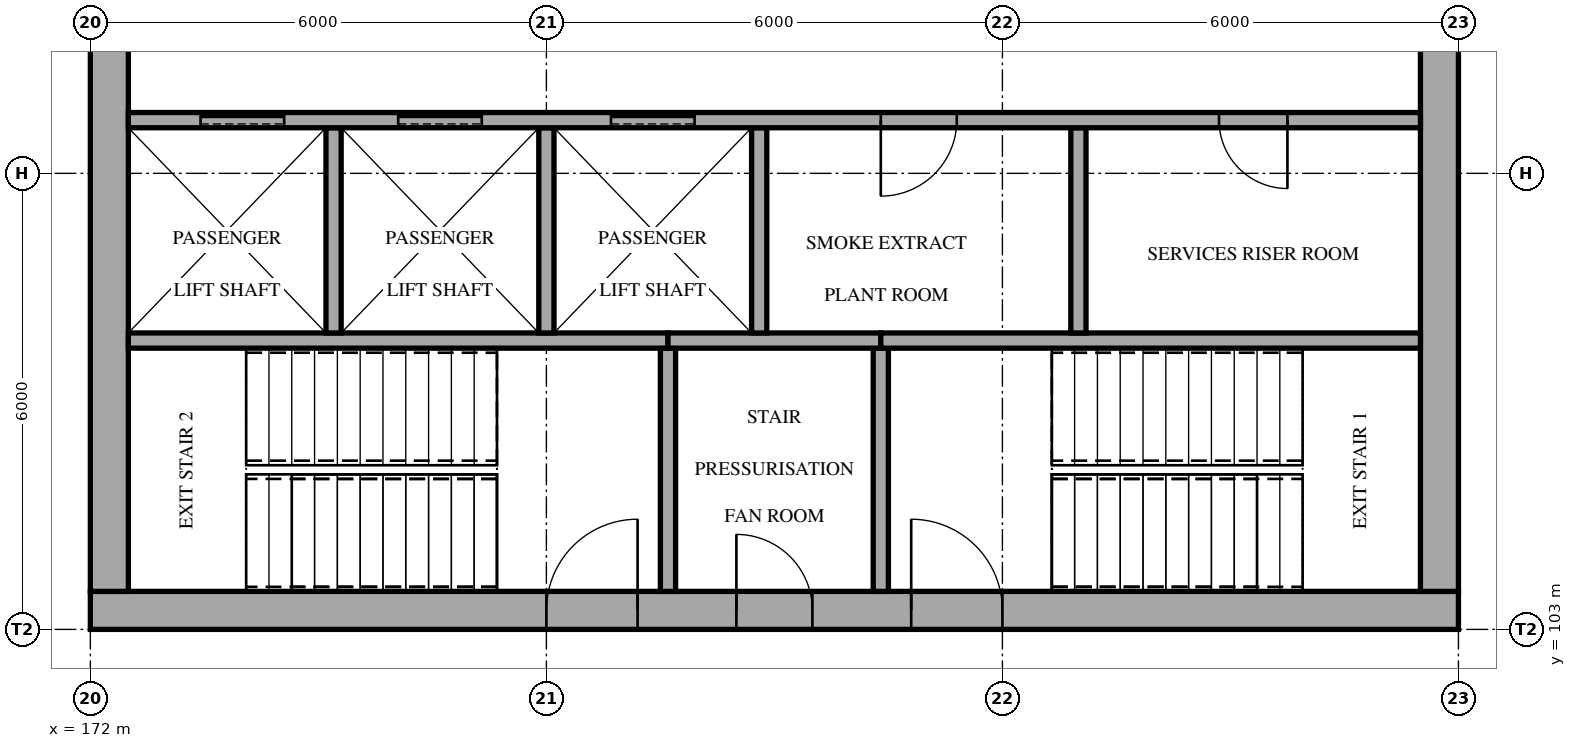
"""IFC4 building model, lengths in metres.
Left out: names, types, materials, properties, quantities, classifications, styles, units other than length and angle.
Written with IfcOpenShell. Run it as: python <this file> out.ifc"""

import sys

from ifc_helpers import new_model, si_unit, direction, frame, frame_2d, origin, place, context, subcontext, project, spatial, rectangle, extrude, element, fill, save


model = new_model("IFC4")
c1 = context("Model", 3, precision=1e-05, world=origin(), true_north=direction((0.0, 1.0)))
c2 = subcontext(c1, "Body", "Model", "MODEL_VIEW")
j1 = project(units=[si_unit("LENGTHUNIT", "METRE"), si_unit("PLANEANGLEUNIT", "RADIAN")], contexts=[c1])
p1 = place(None, origin())
s1 = spatial("IfcSite", under=j1, at=p1, CompositionType="ELEMENT")
p2 = place(p1, origin())
s2 = spatial("IfcBuilding", under=s1, at=p2, CompositionType="ELEMENT")
p3 = place(p2, origin())
s3 = spatial("IfcBuildingStorey", under=s2, at=p3, CompositionType="ELEMENT", Elevation=0.0)
p4 = place(p3, frame((172.0, 103.25, 0.0), z_axis=(0.0, 0.0, 1.0), x_axis=(1.0, 0.0, 0.0)))
e1 = element("IfcWall", 1, at=p4, inside=s3, PredefinedType="SHEAR", context=c2, shape_type="SweptSolid", body=[
    extrude(rectangle(XDim=18.0, YDim=0.5, at=frame_2d((9.0, 0.0))), origin(), (0.0, 0.0, 1.0), 5.0),
])
p5 = place(p4, frame((8.5, 0.0, 0.0)))
e2 = element("IfcOpeningElement", 2, at=p5, cuts=e1, PredefinedType="OPENING", context=c2, shape_type="SweptSolid", body=[
    extrude(rectangle(XDim=1.0, YDim=2.1, at=frame_2d((0.5, 1.05))), frame((0.0, 0.26, 0.0), z_axis=(0.0, -1.0, 0.0), x_axis=(1.0, 0.0, 0.0)), (0.0, 0.0, 1.0), 0.52),
])
p6 = place(p4, frame((6.0, 0.0, 0.0)))
e3 = element("IfcOpeningElement", 3, at=p6, cuts=e1, PredefinedType="OPENING", context=c2, shape_type="SweptSolid", body=[
    extrude(rectangle(XDim=1.2, YDim=2.1, at=frame_2d((0.6, 1.05))), frame((0.0, 0.26, 0.0), z_axis=(0.0, -1.0, 0.0), x_axis=(1.0, 0.0, 0.0)), (0.0, 0.0, 1.0), 0.52),
])
p7 = place(p4, frame((10.8, 0.0, 0.0)))
e4 = element("IfcOpeningElement", 4, at=p7, cuts=e1, PredefinedType="OPENING", context=c2, shape_type="SweptSolid", body=[
    extrude(rectangle(XDim=1.2, YDim=2.1, at=frame_2d((0.6, 1.05))), frame((0.0, 0.26, 0.0), z_axis=(0.0, -1.0, 0.0), x_axis=(1.0, 0.0, 0.0)), (0.0, 0.0, 1.0), 0.52),
])
p8 = place(p3, frame((172.25, 103.5, 0.0), z_axis=(0.0, 0.0, 1.0), x_axis=(0.0, 1.0, 0.0)))
e5 = element("IfcWall", 5, at=p8, inside=s3, PredefinedType="SHEAR", context=c2, shape_type="SweptSolid", body=[
    extrude(rectangle(XDim=17.0, YDim=0.5, at=frame_2d((8.5, 0.0))), origin(), (0.0, 0.0, 1.0), 5.0),
])
p9 = place(p8, frame((7.2, 0.0, 0.0)))
e6 = element("IfcOpeningElement", 6, at=p9, cuts=e5, PredefinedType="OPENING", context=c2, shape_type="SweptSolid", body=[
    extrude(rectangle(XDim=1.4, YDim=2.1, at=frame_2d((0.7, 1.05))), frame((0.0, 0.26, 0.0), z_axis=(0.0, -1.0, 0.0), x_axis=(1.0, 0.0, 0.0)), (0.0, 0.0, 1.0), 0.52),
])
p10 = place(p3, frame((189.75, 103.5, 0.0), z_axis=(0.0, 0.0, 1.0), x_axis=(0.0, 1.0, 0.0)))
e7 = element("IfcWall", 7, at=p10, inside=s3, PredefinedType="SHEAR", context=c2, shape_type="SweptSolid", body=[
    extrude(rectangle(XDim=17.0, YDim=0.5, at=frame_2d((8.5, 0.0))), origin(), (0.0, 0.0, 1.0), 5.0),
])
p11 = place(p10, frame((7.2, 0.0, 0.0)))
e8 = element("IfcOpeningElement", 8, at=p11, cuts=e7, PredefinedType="OPENING", context=c2, shape_type="SweptSolid", body=[
    extrude(rectangle(XDim=1.4, YDim=2.1, at=frame_2d((0.7, 1.05))), frame((0.0, 0.26, 0.0), z_axis=(0.0, -1.0, 0.0), x_axis=(1.0, 0.0, 0.0)), (0.0, 0.0, 1.0), 0.52),
])
for number, where, z_axis, x_axis in (
    (9, (179.6, 103.5, 0.0), (0.0, 0.0, 1.0), (0.0, 1.0, 0.0)),
    (10, (182.4, 103.5, 0.0), (0.0, 0.0, 1.0), (0.0, 1.0, 0.0)),
):
    element("IfcWall", number, at=place(p3, frame(where, z_axis=z_axis, x_axis=x_axis)), inside=s3, PredefinedType="SOLIDWALL", context=c2, shape_type="SweptSolid", body=[
        extrude(rectangle(XDim=3.2, YDim=0.2, at=frame_2d((1.6, 0.0))), origin(), (0.0, 0.0, 1.0), 4.8),
    ])
p12 = place(p3, frame((172.5, 106.8, 0.0), z_axis=(0.0, 0.0, 1.0), x_axis=(1.0, 0.0, 0.0)))
e11 = element("IfcWall", 11, at=p12, inside=s3, PredefinedType="SOLIDWALL", context=c2, shape_type="SweptSolid", body=[
    extrude(rectangle(XDim=7.1, YDim=0.2, at=frame_2d((3.55, 0.0))), origin(), (0.0, 0.0, 1.0), 4.8),
])
p13 = place(p3, frame((179.6, 106.8, 0.0), z_axis=(0.0, 0.0, 1.0), x_axis=(1.0, 0.0, 0.0)))
e12 = element("IfcWall", 12, at=p13, inside=s3, PredefinedType="SOLIDWALL", context=c2, shape_type="SweptSolid", body=[
    extrude(rectangle(XDim=2.8, YDim=0.2, at=frame_2d((1.4, 0.0))), origin(), (0.0, 0.0, 1.0), 4.8),
])
p14 = place(p3, frame((182.4, 106.8, 0.0), z_axis=(0.0, 0.0, 1.0), x_axis=(1.0, 0.0, 0.0)))
e13 = element("IfcWall", 13, at=p14, inside=s3, PredefinedType="SOLIDWALL", context=c2, shape_type="SweptSolid", body=[
    extrude(rectangle(XDim=7.1, YDim=0.2, at=frame_2d((3.55, 0.0))), origin(), (0.0, 0.0, 1.0), 4.8),
])
for number, where, z_axis, x_axis in (
    (14, (175.2, 106.9, 0.0), (0.0, 0.0, 1.0), (0.0, 1.0, 0.0)),
    (15, (178.0, 106.9, 0.0), (0.0, 0.0, 1.0), (0.0, 1.0, 0.0)),
    (16, (180.8, 106.9, 0.0), (0.0, 0.0, 1.0), (0.0, 1.0, 0.0)),
    (17, (185.0, 106.9, 0.0), (0.0, 0.0, 1.0), (0.0, 1.0, 0.0)),
):
    element("IfcWall", number, at=place(p3, frame(where, z_axis=z_axis, x_axis=x_axis)), inside=s3, PredefinedType="SOLIDWALL", context=c2, shape_type="SweptSolid", body=[
        extrude(rectangle(XDim=2.7, YDim=0.2, at=frame_2d((1.35, 0.0))), origin(), (0.0, 0.0, 1.0), 4.8),
    ])
p15 = place(p3, frame((172.5, 109.7, 0.0), z_axis=(0.0, 0.0, 1.0), x_axis=(1.0, 0.0, 0.0)))
e18 = element("IfcWall", 18, at=p15, inside=s3, PredefinedType="SOLIDWALL", context=c2, shape_type="SweptSolid", body=[
    extrude(rectangle(XDim=17.0, YDim=0.2, at=frame_2d((8.5, 0.0))), origin(), (0.0, 0.0, 1.0), 4.8),
])
p16 = place(p15, frame((0.95, 0.0, 0.0)))
e19 = element("IfcOpeningElement", 19, at=p16, cuts=e18, PredefinedType="OPENING", context=c2, shape_type="SweptSolid", body=[
    extrude(rectangle(XDim=1.1, YDim=2.1, at=frame_2d((0.55, 1.05))), frame((0.0, 0.11, 0.0), z_axis=(0.0, -1.0, 0.0), x_axis=(1.0, 0.0, 0.0)), (0.0, 0.0, 1.0), 0.22),
])
p17 = place(p15, frame((3.55, 0.0, 0.0)))
e20 = element("IfcOpeningElement", 20, at=p17, cuts=e18, PredefinedType="OPENING", context=c2, shape_type="SweptSolid", body=[
    extrude(rectangle(XDim=1.1, YDim=2.1, at=frame_2d((0.55, 1.05))), frame((0.0, 0.11, 0.0), z_axis=(0.0, -1.0, 0.0), x_axis=(1.0, 0.0, 0.0)), (0.0, 0.0, 1.0), 0.22),
])
p18 = place(p15, frame((6.35, 0.0, 0.0)))
e21 = element("IfcOpeningElement", 21, at=p18, cuts=e18, PredefinedType="OPENING", context=c2, shape_type="SweptSolid", body=[
    extrude(rectangle(XDim=1.1, YDim=2.1, at=frame_2d((0.55, 1.05))), frame((0.0, 0.11, 0.0), z_axis=(0.0, -1.0, 0.0), x_axis=(1.0, 0.0, 0.0)), (0.0, 0.0, 1.0), 0.22),
])
p19 = place(p15, frame((9.9, 0.0, 0.0)))
e22 = element("IfcOpeningElement", 22, at=p19, cuts=e18, PredefinedType="OPENING", context=c2, shape_type="SweptSolid", body=[
    extrude(rectangle(XDim=1.0, YDim=2.1, at=frame_2d((0.5, 1.05))), frame((0.0, 0.11, 0.0), z_axis=(0.0, -1.0, 0.0), x_axis=(1.0, 0.0, 0.0)), (0.0, 0.0, 1.0), 0.22),
])
p20 = place(p15, frame((14.35, 0.0, 0.0)))
e23 = element("IfcOpeningElement", 23, at=p20, cuts=e18, PredefinedType="OPENING", context=c2, shape_type="SweptSolid", body=[
    extrude(rectangle(XDim=0.9, YDim=2.1, at=frame_2d((0.45, 1.05))), frame((0.0, 0.11, 0.0), z_axis=(0.0, -1.0, 0.0), x_axis=(1.0, 0.0, 0.0)), (0.0, 0.0, 1.0), 0.22),
])
p21 = place(p5, origin())
e24 = element("IfcDoor", 24, at=p21, inside=s3, OperationType="SINGLE_SWING_LEFT", PredefinedType="DOOR", context=c2, shape_type="SweptSolid", body=[
    extrude(rectangle(XDim=1.0, YDim=2.1, at=frame_2d((0.5, 1.05))), frame((0.0, 0.025, 0.0), z_axis=(0.0, -1.0, 0.0), x_axis=(1.0, 0.0, 0.0)), (0.0, 0.0, 1.0), 0.05),
])
fill(e2, e24)
p22 = place(p16, origin())
e25 = element("IfcDoor", 25, at=p22, inside=s3, OperationType="SLIDING_TO_LEFT", PredefinedType="DOOR", context=c2, shape_type="SweptSolid", body=[
    extrude(rectangle(XDim=1.1, YDim=2.1, at=frame_2d((0.55, 1.05))), frame((0.0, 0.025, 0.0), z_axis=(0.0, -1.0, 0.0), x_axis=(1.0, 0.0, 0.0)), (0.0, 0.0, 1.0), 0.05),
])
fill(e19, e25)
p23 = place(p17, origin())
e26 = element("IfcDoor", 26, at=p23, inside=s3, OperationType="SLIDING_TO_LEFT", PredefinedType="DOOR", context=c2, shape_type="SweptSolid", body=[
    extrude(rectangle(XDim=1.1, YDim=2.1, at=frame_2d((0.55, 1.05))), frame((0.0, 0.025, 0.0), z_axis=(0.0, -1.0, 0.0), x_axis=(1.0, 0.0, 0.0)), (0.0, 0.0, 1.0), 0.05),
])
fill(e20, e26)
p24 = place(p18, origin())
e27 = element("IfcDoor", 27, at=p24, inside=s3, OperationType="SLIDING_TO_LEFT", PredefinedType="DOOR", context=c2, shape_type="SweptSolid", body=[
    extrude(rectangle(XDim=1.1, YDim=2.1, at=frame_2d((0.55, 1.05))), frame((0.0, 0.025, 0.0), z_axis=(0.0, -1.0, 0.0), x_axis=(1.0, 0.0, 0.0)), (0.0, 0.0, 1.0), 0.05),
])
fill(e21, e27)
p25 = place(p19, frame((1.0, 0.0, 0.0), z_axis=(0.0, 0.0, 1.0), x_axis=(-1.0, 0.0, 0.0)))
e28 = element("IfcDoor", 28, at=p25, inside=s3, OperationType="SINGLE_SWING_RIGHT", PredefinedType="DOOR", context=c2, shape_type="SweptSolid", body=[
    extrude(rectangle(XDim=1.0, YDim=2.1, at=frame_2d((0.5, 1.05))), frame((0.0, 0.025, 0.0), z_axis=(0.0, -1.0, 0.0), x_axis=(1.0, 0.0, 0.0)), (0.0, 0.0, 1.0), 0.05),
])
fill(e22, e28)
p26 = place(p20, frame((0.9, 0.0, 0.0), z_axis=(0.0, 0.0, 1.0), x_axis=(-1.0, 0.0, 0.0)))
e29 = element("IfcDoor", 29, at=p26, inside=s3, OperationType="SINGLE_SWING_LEFT", PredefinedType="DOOR", context=c2, shape_type="SweptSolid", body=[
    extrude(rectangle(XDim=0.9, YDim=2.1, at=frame_2d((0.45, 1.05))), frame((0.0, 0.025, 0.0), z_axis=(0.0, -1.0, 0.0), x_axis=(1.0, 0.0, 0.0)), (0.0, 0.0, 1.0), 0.05),
])
fill(e23, e29)
p27 = place(p6, origin())
e30 = element("IfcDoor", 30, at=p27, inside=s3, OperationType="SINGLE_SWING_RIGHT", PredefinedType="DOOR", context=c2, shape_type="SweptSolid", body=[
    extrude(rectangle(XDim=1.2, YDim=2.1, at=frame_2d((0.6, 1.05))), frame((0.0, 0.025, 0.0), z_axis=(0.0, -1.0, 0.0), x_axis=(1.0, 0.0, 0.0)), (0.0, 0.0, 1.0), 0.05),
])
fill(e3, e30)
p28 = place(p7, origin())
e31 = element("IfcDoor", 31, at=p28, inside=s3, OperationType="SINGLE_SWING_LEFT", PredefinedType="DOOR", context=c2, shape_type="SweptSolid", body=[
    extrude(rectangle(XDim=1.2, YDim=2.1, at=frame_2d((0.6, 1.05))), frame((0.0, 0.025, 0.0), z_axis=(0.0, -1.0, 0.0), x_axis=(1.0, 0.0, 0.0)), (0.0, 0.0, 1.0), 0.05),
])
fill(e4, e31)
save(model, sys.argv[1])
